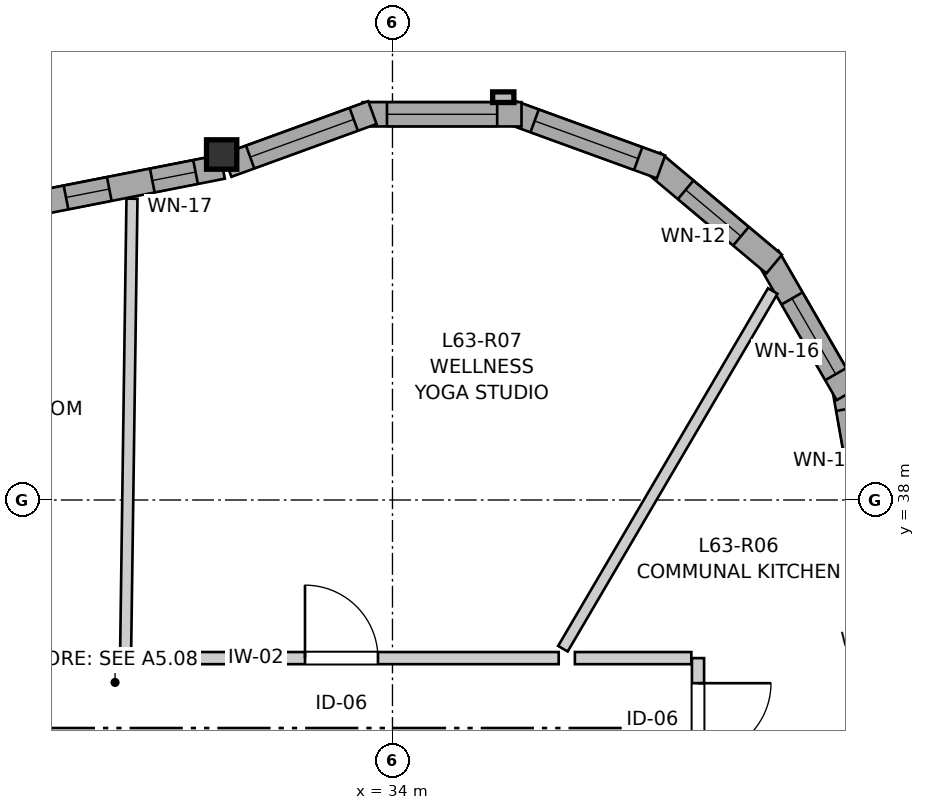
"""IFC4 building model, lengths in metres.
Left out: names, types, materials, properties, quantities, classifications, styles, units other than length and angle.
Written with IfcOpenShell. Run it as: python <this file> out.ifc"""

import sys

from ifc_helpers import new_model, si_unit, direction, frame, frame_2d, origin, origin_2d, place, context, subcontext, project, spatial, rectangle, i_section, extrude, source, transform, mapped, element, fill, save


model = new_model("IFC4")
c1 = context("Model", 3, precision=1e-05, world=origin(), true_north=direction((0.0, 1.0)))
c2 = subcontext(c1, "Body", "Model", "MODEL_VIEW")
j1 = project(units=[si_unit("LENGTHUNIT", "METRE"), si_unit("PLANEANGLEUNIT", "RADIAN")], contexts=[c1])
p1 = place(None, origin())
s1 = spatial("IfcSite", under=j1, at=p1, CompositionType="ELEMENT")
p2 = place(p1, origin())
s2 = spatial("IfcBuilding", under=s1, at=p2, CompositionType="ELEMENT")
p3 = place(p2, frame((0.0, 0.0, 211.6)))
s3 = spatial("IfcBuildingStorey", under=s2, at=p3, CompositionType="ELEMENT", Elevation=211.6)
m1 = source(origin(), c2, "Body", "SweptSolid", [
    extrude(i_section(OverallWidth=0.398, OverallDepth=0.387, WebThickness=0.019, FlangeThickness=0.03, FilletRadius=0.015, at=origin_2d()), origin(), (0.0, 0.0, 1.0), 2.96),
])
p4 = place(p3, frame((31.752, 42.545, 0.0), z_axis=(0.0, 0.0, 1.0), x_axis=(1.0, 0.0, 0.0)))
e1 = element("IfcColumn", 1, at=p4, inside=s3, PredefinedType="PILASTER", context=c2, shape_type="MappedRepresentation", body=[
    mapped(m1, transform((0.0, 0.0, 0.0), x_axis=(1.0, 0.0, 0.0), y_axis=(0.0, 1.0, 0.0), z_axis=(0.0, 0.0, 1.0), scale=1.0)),
])
p5 = place(p3, frame((40.279, 37.583, 0.0), z_axis=(0.0, 0.0, 1.0), x_axis=(-0.173671780312, 0.984803590937, 0.0)))
e2 = element("IfcWall", 2, at=p5, inside=s3, PredefinedType="SOLIDWALL", context=c2, shape_type="SweptSolid", body=[
    extrude(rectangle(XDim=1.962, YDim=0.32, at=frame_2d((0.981, 0.0))), origin(), (0.0, 0.0, 1.0), 2.58),
])
p6 = place(p5, frame((0.391, 0.0, 0.82)))
e3 = element("IfcOpeningElement", 3, at=p6, cuts=e2, PredefinedType="OPENING", context=c2, shape_type="SweptSolid", body=[
    extrude(rectangle(XDim=1.25, YDim=1.35, at=frame_2d((0.625, 0.675))), frame((0.0, 0.17, 0.0), z_axis=(0.0, -1.0, 0.0), x_axis=(1.0, 0.0, 0.0)), (0.0, 0.0, 1.0), 0.34),
])
p7 = place(p3, frame((39.983, 39.393, 0.0), z_axis=(0.0, 0.0, 1.0), x_axis=(-0.499995423472, 0.866028046028, 0.0)))
e4 = element("IfcWall", 4, at=p7, inside=s3, PredefinedType="SOLIDWALL", context=c2, shape_type="SweptSolid", body=[
    extrude(rectangle(XDim=2.09, YDim=0.32, at=frame_2d((1.045, 0.0))), origin(), (0.0, 0.0, 1.0), 2.58),
])
p8 = place(p7, frame((0.303, 0.0, 0.82)))
e5 = element("IfcOpeningElement", 5, at=p8, cuts=e4, PredefinedType="OPENING", context=c2, shape_type="SweptSolid", body=[
    extrude(rectangle(XDim=1.15, YDim=1.2, at=frame_2d((0.575, 0.6))), frame((0.0, 0.17, 0.0), z_axis=(0.0, -1.0, 0.0), x_axis=(1.0, 0.0, 0.0)), (0.0, 0.0, 1.0), 0.34),
])
p9 = place(p3, frame((39.022, 41.104, 0.0), z_axis=(0.0, 0.0, 1.0), x_axis=(-0.766072824549, 0.642753784499, 0.0)))
e6 = element("IfcWall", 6, at=p9, inside=s3, PredefinedType="SOLIDWALL", context=c2, shape_type="SweptSolid", body=[
    extrude(rectangle(XDim=2.091, YDim=0.32, at=frame_2d((1.045, 0.0))), origin(), (0.0, 0.0, 1.0), 2.58),
])
p10 = place(p9, frame((0.57, 0.0, 0.82)))
e7 = element("IfcOpeningElement", 7, at=p10, cuts=e6, PredefinedType="OPENING", context=c2, shape_type="SweptSolid", body=[
    extrude(rectangle(XDim=0.95, YDim=1.35, at=frame_2d((0.475, 0.675))), frame((0.0, 0.17, 0.0), z_axis=(0.0, -1.0, 0.0), x_axis=(1.0, 0.0, 0.0)), (0.0, 0.0, 1.0), 0.34),
])
p11 = place(p3, frame((37.533, 42.382, 0.0), z_axis=(0.0, 0.0, 1.0), x_axis=(-0.939697896412, 0.342005648315, 0.0)))
e8 = element("IfcWall", 8, at=p11, inside=s3, PredefinedType="SOLIDWALL", context=c2, shape_type="SweptSolid", body=[
    extrude(rectangle(XDim=2.09, YDim=0.32, at=frame_2d((1.045, 0.0))), origin(), (0.0, 0.0, 1.0), 2.58),
])
p12 = place(p11, frame((0.32, 0.0, 0.82)))
e9 = element("IfcOpeningElement", 9, at=p12, cuts=e8, PredefinedType="OPENING", context=c2, shape_type="SweptSolid", body=[
    extrude(rectangle(XDim=1.45, YDim=1.25, at=frame_2d((0.725, 0.625))), frame((0.0, 0.17, 0.0), z_axis=(0.0, -1.0, 0.0), x_axis=(1.0, 0.0, 0.0)), (0.0, 0.0, 1.0), 0.34),
])
p13 = place(p3, frame((35.698, 43.074, 0.0), z_axis=(0.0, 0.0, 1.0), x_axis=(-1.0, 0.0, 0.0)))
e10 = element("IfcWall", 10, at=p13, inside=s3, PredefinedType="SOLIDWALL", context=c2, shape_type="SweptSolid", body=[
    extrude(rectangle(XDim=2.09, YDim=0.32, at=frame_2d((1.045, 0.0))), origin(), (0.0, 0.0, 1.0), 2.58),
])
p14 = place(p13, frame((0.32, 0.0, 0.82)))
e11 = element("IfcOpeningElement", 11, at=p14, cuts=e10, PredefinedType="OPENING", context=c2, shape_type="SweptSolid", body=[
    extrude(rectangle(XDim=1.45, YDim=1.25, at=frame_2d((0.725, 0.625))), frame((0.0, 0.17, 0.0), z_axis=(0.0, -1.0, 0.0), x_axis=(1.0, 0.0, 0.0)), (0.0, 0.0, 1.0), 0.34),
])
p15 = place(p3, frame((33.736, 43.097, 0.0), z_axis=(0.0, 0.0, 1.0), x_axis=(-0.939691662178, -0.342022777067, 0.0)))
e12 = element("IfcWall", 12, at=p15, inside=s3, PredefinedType="SOLIDWALL", context=c2, shape_type="SweptSolid", body=[
    extrude(rectangle(XDim=2.032, YDim=0.32, at=frame_2d((1.016, 0.0))), origin(), (0.0, 0.0, 1.0), 2.58),
])
p16 = place(p15, frame((0.261, 0.0, 0.82)))
e13 = element("IfcOpeningElement", 13, at=p16, cuts=e12, PredefinedType="OPENING", context=c2, shape_type="SweptSolid", body=[
    extrude(rectangle(XDim=1.45, YDim=1.25, at=frame_2d((0.725, 0.625))), frame((0.0, 0.17, 0.0), z_axis=(0.0, -1.0, 0.0), x_axis=(1.0, 0.0, 0.0)), (0.0, 0.0, 1.0), 0.34),
])
p17 = place(p3, frame((31.764, 42.385, 0.0), z_axis=(0.0, 0.0, 1.0), x_axis=(-0.981229659911, -0.192842823335, 0.0)))
e14 = element("IfcWall", 14, at=p17, inside=s3, PredefinedType="SOLIDWALL", context=c2, shape_type="SweptSolid", body=[
    extrude(rectangle(XDim=2.454, YDim=0.32, at=frame_2d((1.227, 0.0))), origin(), (0.0, 0.0, 1.0), 2.58),
])
p18 = place(p17, frame((0.361, 0.0, 0.82)))
e15 = element("IfcOpeningElement", 15, at=p18, cuts=e14, PredefinedType="OPENING", context=c2, shape_type="SweptSolid", body=[
    extrude(rectangle(XDim=0.58, YDim=1.35, at=frame_2d((0.29, 0.675))), frame((0.0, 0.17, 0.0), z_axis=(0.0, -1.0, 0.0), x_axis=(1.0, 0.0, 0.0)), (0.0, 0.0, 1.0), 0.34),
])
p19 = place(p17, frame((1.518, 0.0, 0.82)))
e16 = element("IfcOpeningElement", 16, at=p19, cuts=e14, PredefinedType="OPENING", context=c2, shape_type="SweptSolid", body=[
    extrude(rectangle(XDim=0.58, YDim=1.35, at=frame_2d((0.29, 0.675))), frame((0.0, 0.17, 0.0), z_axis=(0.0, -1.0, 0.0), x_axis=(1.0, 0.0, 0.0)), (0.0, 0.0, 1.0), 0.34),
])
p20 = place(p3, frame((30.474, 35.92, 0.0), z_axis=(0.0, 0.0, 1.0), x_axis=(1.0, 0.0, 0.0)))
e17 = element("IfcWall", 17, at=p20, inside=s3, PredefinedType="PARTITIONING", context=c2, shape_type="SweptSolid", body=[
    extrude(rectangle(XDim=5.713, YDim=0.16, at=frame_2d((2.856, 0.0))), origin(), (0.0, 0.0, 1.0), 2.96),
])
p21 = place(p20, frame((2.375, 0.0, 0.0)))
e18 = element("IfcOpeningElement", 18, at=p21, cuts=e17, PredefinedType="OPENING", context=c2, shape_type="SweptSolid", body=[
    extrude(rectangle(XDim=0.96, YDim=2.1, at=frame_2d((0.48, 1.05))), frame((0.0, 0.09, 0.0), z_axis=(0.0, -1.0, 0.0), x_axis=(1.0, 0.0, 0.0)), (0.0, 0.0, 1.0), 0.18),
])
p22 = place(p3, frame((27.598, 35.92, 0.0), z_axis=(0.0, 0.0, 1.0), x_axis=(1.0, 0.0, 0.0)))
e19 = element("IfcWall", 19, at=p22, inside=s3, PredefinedType="PARTITIONING", context=c2, shape_type="SweptSolid", body=[
    extrude(rectangle(XDim=2.861, YDim=0.16, at=frame_2d((1.431, 0.0))), origin(), (0.0, 0.0, 1.0), 2.96),
])
p23 = place(p22, frame((0.95, 0.0, 0.0)))
e20 = element("IfcOpeningElement", 20, at=p23, cuts=e19, PredefinedType="OPENING", context=c2, shape_type="SweptSolid", body=[
    extrude(rectangle(XDim=0.96, YDim=2.1, at=frame_2d((0.48, 1.05))), frame((0.0, 0.09, 0.0), z_axis=(0.0, -1.0, 0.0), x_axis=(1.0, 0.0, 0.0)), (0.0, 0.0, 1.0), 0.18),
])
p24 = place(p3, frame((38.02, 35.92, 0.0), z_axis=(0.0, 0.0, 1.0), x_axis=(0.0, -1.0, 0.0)))
e21 = element("IfcWall", 21, at=p24, inside=s3, PredefinedType="PARTITIONING", context=c2, shape_type="SweptSolid", body=[
    extrude(rectangle(XDim=1.62, YDim=0.16, at=frame_2d((0.81, 0.0))), origin(), (0.0, 0.0, 1.0), 2.628),
])
p25 = place(p24, frame((0.33, 0.0, 0.0)))
e22 = element("IfcOpeningElement", 22, at=p25, cuts=e21, PredefinedType="OPENING", context=c2, shape_type="SweptSolid", body=[
    extrude(rectangle(XDim=0.96, YDim=2.1, at=frame_2d((0.48, 1.05))), frame((0.0, 0.09, 0.0), z_axis=(0.0, -1.0, 0.0), x_axis=(1.0, 0.0, 0.0)), (0.0, 0.0, 1.0), 0.18),
])
p26 = place(p3, frame((30.489, 36.009, 0.0), z_axis=(0.0, 0.0, 1.0), x_axis=(0.013978627514, 0.999902294213, 0.0)))
e23 = element("IfcWall", 23, at=p26, inside=s3, PredefinedType="PARTITIONING", context=c2, shape_type="SweptSolid", body=[
    extrude(rectangle(XDim=5.956, YDim=0.145, at=frame_2d((2.978, 0.0))), origin(), (0.0, 0.0, 1.0), 2.96),
])
p27 = place(p3, frame((36.242, 36.044, 0.0), z_axis=(0.0, 0.0, 1.0), x_axis=(0.50599508157, 0.862536362959, 0.0)))
e24 = element("IfcWall", 24, at=p27, inside=s3, PredefinedType="PARTITIONING", context=c2, shape_type="SweptSolid", body=[
    extrude(rectangle(XDim=5.456, YDim=0.145, at=frame_2d((2.728, 0.0))), origin(), (0.0, 0.0, 1.0), 2.96),
])
p28 = place(p3, frame((38.154, 32.845, 0.0), z_axis=(0.0, 0.0, 1.0), x_axis=(0.751793032372, 0.659399148071, 0.0)))
e25 = element("IfcWall", 25, at=p28, inside=s3, PredefinedType="PARTITIONING", context=c2, shape_type="SweptSolid", body=[
    extrude(rectangle(XDim=3.631, YDim=0.145, at=frame_2d((1.815, 0.0))), origin(), (0.0, 0.0, 1.0), 2.96),
])
p29 = place(p3, frame((36.4, 35.92, 0.0), z_axis=(0.0, 0.0, 1.0), x_axis=(1.0, 0.0, 0.0)))
e26 = element("IfcWall", 26, at=p29, inside=s3, PredefinedType="PARTITIONING", context=c2, shape_type="SweptSolid", body=[
    extrude(rectangle(XDim=1.532, YDim=0.16, at=frame_2d((0.766, 0.0))), origin(), (0.0, 0.0, 1.0), 2.96),
])
m2 = source(origin(), c2, "Body", "SweptSolid", [
    extrude(rectangle(XDim=1.25, YDim=1.35, at=frame_2d((0.625, 0.675))), frame((0.0, 0.03, 0.0), z_axis=(0.0, -1.0, 0.0), x_axis=(1.0, 0.0, 0.0)), (0.0, 0.0, 1.0), 0.06),
])
p30 = place(p6, origin())
e27 = element("IfcWindow", 27, at=p30, inside=s3, PartitioningType="SINGLE_PANEL", PredefinedType="WINDOW", context=c2, shape_type="MappedRepresentation", body=[
    mapped(m2, transform((0.0, 0.0, 0.0), x_axis=(1.0, 0.0, 0.0), y_axis=(0.0, 1.0, 0.0), z_axis=(0.0, 0.0, 1.0), scale=1.0)),
])
fill(e3, e27)
m3 = source(origin(), c2, "Body", "SweptSolid", [
    extrude(rectangle(XDim=1.15, YDim=1.2, at=frame_2d((0.575, 0.6))), frame((0.0, 0.03, 0.0), z_axis=(0.0, -1.0, 0.0), x_axis=(1.0, 0.0, 0.0)), (0.0, 0.0, 1.0), 0.06),
])
p31 = place(p8, origin())
e28 = element("IfcWindow", 28, at=p31, inside=s3, PartitioningType="SINGLE_PANEL", PredefinedType="WINDOW", context=c2, shape_type="MappedRepresentation", body=[
    mapped(m3, transform((0.0, 0.0, 0.0), x_axis=(1.0, 0.0, 0.0), y_axis=(0.0, 1.0, 0.0), z_axis=(0.0, 0.0, 1.0), scale=1.0)),
])
fill(e5, e28)
m4 = source(origin(), c2, "Body", "SweptSolid", [
    extrude(rectangle(XDim=0.95, YDim=1.35, at=frame_2d((0.475, 0.675))), frame((0.0, 0.03, 0.0), z_axis=(0.0, -1.0, 0.0), x_axis=(1.0, 0.0, 0.0)), (0.0, 0.0, 1.0), 0.06),
])
p32 = place(p10, origin())
e29 = element("IfcWindow", 29, at=p32, inside=s3, PartitioningType="SINGLE_PANEL", PredefinedType="WINDOW", context=c2, shape_type="MappedRepresentation", body=[
    mapped(m4, transform((0.0, 0.0, 0.0), x_axis=(1.0, 0.0, 0.0), y_axis=(0.0, 1.0, 0.0), z_axis=(0.0, 0.0, 1.0), scale=1.0)),
])
fill(e7, e29)
m5 = source(origin(), c2, "Body", "SweptSolid", [
    extrude(rectangle(XDim=1.45, YDim=1.25, at=frame_2d((0.725, 0.625))), frame((0.0, 0.03, 0.0), z_axis=(0.0, -1.0, 0.0), x_axis=(1.0, 0.0, 0.0)), (0.0, 0.0, 1.0), 0.06),
])
p33 = place(p12, origin())
e30 = element("IfcWindow", 30, at=p33, inside=s3, PartitioningType="SINGLE_PANEL", PredefinedType="WINDOW", context=c2, shape_type="MappedRepresentation", body=[
    mapped(m5, transform((0.0, 0.0, 0.0), x_axis=(1.0, 0.0, 0.0), y_axis=(0.0, 1.0, 0.0), z_axis=(0.0, 0.0, 1.0), scale=1.0)),
])
fill(e9, e30)
p34 = place(p14, origin())
e31 = element("IfcWindow", 31, at=p34, inside=s3, PartitioningType="SINGLE_PANEL", PredefinedType="WINDOW", context=c2, shape_type="MappedRepresentation", body=[
    mapped(m5, transform((0.0, 0.0, 0.0), x_axis=(1.0, 0.0, 0.0), y_axis=(0.0, 1.0, 0.0), z_axis=(0.0, 0.0, 1.0), scale=1.0)),
])
fill(e11, e31)
p35 = place(p16, origin())
e32 = element("IfcWindow", 32, at=p35, inside=s3, PartitioningType="SINGLE_PANEL", PredefinedType="WINDOW", context=c2, shape_type="MappedRepresentation", body=[
    mapped(m5, transform((0.0, 0.0, 0.0), x_axis=(1.0, 0.0, 0.0), y_axis=(0.0, 1.0, 0.0), z_axis=(0.0, 0.0, 1.0), scale=1.0)),
])
fill(e13, e32)
m6 = source(origin(), c2, "Body", "SweptSolid", [
    extrude(rectangle(XDim=0.58, YDim=1.35, at=frame_2d((0.29, 0.675))), frame((0.0, 0.03, 0.0), z_axis=(0.0, -1.0, 0.0), x_axis=(1.0, 0.0, 0.0)), (0.0, 0.0, 1.0), 0.06),
])
p36 = place(p18, origin())
e33 = element("IfcWindow", 33, at=p36, inside=s3, PartitioningType="SINGLE_PANEL", PredefinedType="WINDOW", context=c2, shape_type="MappedRepresentation", body=[
    mapped(m6, transform((0.0, 0.0, 0.0), x_axis=(1.0, 0.0, 0.0), y_axis=(0.0, 1.0, 0.0), z_axis=(0.0, 0.0, 1.0), scale=1.0)),
])
fill(e15, e33)
p37 = place(p19, origin())
e34 = element("IfcWindow", 34, at=p37, inside=s3, PartitioningType="SINGLE_PANEL", PredefinedType="WINDOW", context=c2, shape_type="MappedRepresentation", body=[
    mapped(m6, transform((0.0, 0.0, 0.0), x_axis=(1.0, 0.0, 0.0), y_axis=(0.0, 1.0, 0.0), z_axis=(0.0, 0.0, 1.0), scale=1.0)),
])
fill(e16, e34)
m7 = source(origin(), c2, "Body", "SweptSolid", [
    extrude(rectangle(XDim=0.96, YDim=2.1, at=frame_2d((0.48, 1.05))), frame((0.0, 0.025, 0.0), z_axis=(0.0, -1.0, 0.0), x_axis=(1.0, 0.0, 0.0)), (0.0, 0.0, 1.0), 0.05),
])
p38 = place(p21, origin())
e35 = element("IfcDoor", 35, at=p38, inside=s3, OperationType="SINGLE_SWING_LEFT", PredefinedType="DOOR", context=c2, shape_type="MappedRepresentation", body=[
    mapped(m7, transform((0.0, 0.0, 0.0), x_axis=(1.0, 0.0, 0.0), y_axis=(0.0, 1.0, 0.0), z_axis=(0.0, 0.0, 1.0), scale=1.0)),
])
fill(e18, e35)
p39 = place(p25, origin())
e36 = element("IfcDoor", 36, at=p39, inside=s3, OperationType="SINGLE_SWING_LEFT", PredefinedType="DOOR", context=c2, shape_type="MappedRepresentation", body=[
    mapped(m7, transform((0.0, 0.0, 0.0), x_axis=(1.0, 0.0, 0.0), y_axis=(0.0, 1.0, 0.0), z_axis=(0.0, 0.0, 1.0), scale=1.0)),
])
fill(e22, e36)
save(model, sys.argv[1])
